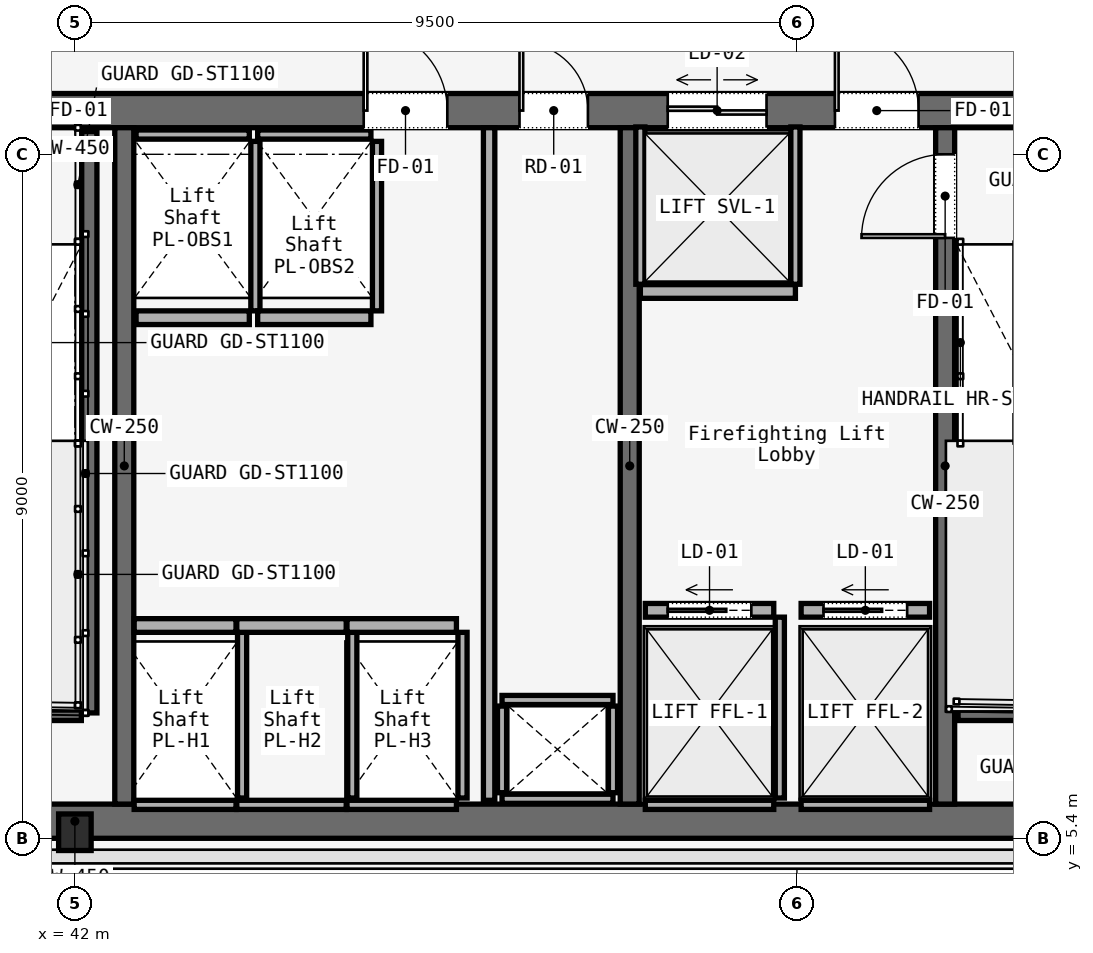
"""IFC4 building model, lengths in metres.
Left out: names, types, materials, properties, quantities, classifications, styles, units other than length and angle.
Written with IfcOpenShell. Run it as: python <this file> out.ifc"""

import sys

from ifc_helpers import new_model, si_unit, direction, frame, frame_2d, origin, origin_2d, place, context, subcontext, project, spatial, rectangle, i_section, extrude, element, fill, save


model = new_model("IFC4")
c1 = context("Model", 3, precision=1e-05, world=origin(), true_north=direction((0.0, 1.0)))
c2 = subcontext(c1, "Body", "Model", "MODEL_VIEW")
j1 = project(units=[si_unit("LENGTHUNIT", "METRE"), si_unit("PLANEANGLEUNIT", "RADIAN")], contexts=[c1])
p1 = place(None, origin())
s1 = spatial("IfcSite", under=j1, at=p1, CompositionType="ELEMENT")
p2 = place(p1, origin())
s2 = spatial("IfcBuilding", under=s1, at=p2, CompositionType="ELEMENT")
p3 = place(p2, frame((0.0, 0.0, 142.2)))
s3 = spatial("IfcBuildingStorey", under=s2, at=p3, CompositionType="ELEMENT", Elevation=142.2)
p4 = place(p3, frame((26.45, 14.975, 0.0), z_axis=(0.0, 0.0, 1.0), x_axis=(1.0, 0.0, 0.0)))
e1 = element("IfcWall", 1, at=p4, inside=s3, PredefinedType="SOLIDWALL", context=c2, shape_type="SweptSolid", body=[
    extrude(rectangle(XDim=31.1, YDim=0.45, at=frame_2d((15.55, 0.0))), origin(), (0.0, 0.0, 1.0), 3.58),
])
p5 = place(p4, frame((1.65, 0.0, 0.0)))
e2 = element("IfcOpeningElement", 2, at=p5, cuts=e1, PredefinedType="OPENING", context=c2, shape_type="SweptSolid", body=[
    extrude(rectangle(XDim=1.1, YDim=2.2, at=frame_2d((0.55, 1.1))), frame((0.0, 0.225, 0.0), z_axis=(0.0, -1.0, 0.0), x_axis=(1.0, 0.0, 0.0)), (0.0, 0.0, 1.0), 0.45),
])
p6 = place(p4, frame((13.65, 0.0, 0.0)))
e3 = element("IfcOpeningElement", 3, at=p6, cuts=e1, PredefinedType="OPENING", context=c2, shape_type="SweptSolid", body=[
    extrude(rectangle(XDim=1.1, YDim=2.2, at=frame_2d((0.55, 1.1))), frame((0.0, 0.225, 0.0), z_axis=(0.0, -1.0, 0.0), x_axis=(1.0, 0.0, 0.0)), (0.0, 0.0, 1.0), 0.45),
])
p7 = place(p4, frame((25.55, 0.0, 0.0)))
e4 = element("IfcOpeningElement", 4, at=p7, cuts=e1, PredefinedType="OPENING", context=c2, shape_type="SweptSolid", body=[
    extrude(rectangle(XDim=1.1, YDim=2.2, at=frame_2d((0.55, 1.1))), frame((0.0, 0.225, 0.0), z_axis=(0.0, -1.0, 0.0), x_axis=(1.0, 0.0, 0.0)), (0.0, 0.0, 1.0), 0.45),
])
p8 = place(p4, frame((10.7, 0.0, 0.0)))
e5 = element("IfcOpeningElement", 5, at=p8, cuts=e1, PredefinedType="OPENING", context=c2, shape_type="SweptSolid", body=[
    extrude(rectangle(XDim=1.4, YDim=2.2, at=frame_2d((0.7, 1.1))), frame((0.0, 0.225, 0.0), z_axis=(0.0, -1.0, 0.0), x_axis=(1.0, 0.0, 0.0)), (0.0, 0.0, 1.0), 0.45),
])
p9 = place(p4, frame((19.35, 0.0, 0.0)))
e6 = element("IfcOpeningElement", 6, at=p9, cuts=e1, PredefinedType="OPENING", context=c2, shape_type="SweptSolid", body=[
    extrude(rectangle(XDim=1.1, YDim=2.2, at=frame_2d((0.55, 1.1))), frame((0.0, 0.225, 0.0), z_axis=(0.0, -1.0, 0.0), x_axis=(1.0, 0.0, 0.0)), (0.0, 0.0, 1.0), 0.45),
])
p10 = place(p4, frame((21.4, 0.0, 0.0)))
e7 = element("IfcOpeningElement", 7, at=p10, cuts=e1, PredefinedType="OPENING", context=c2, shape_type="SweptSolid", body=[
    extrude(rectangle(XDim=0.9, YDim=2.1, at=frame_2d((0.45, 1.05))), frame((0.0, 0.225, 0.0), z_axis=(0.0, -1.0, 0.0), x_axis=(1.0, 0.0, 0.0)), (0.0, 0.0, 1.0), 0.45),
])
p11 = place(p4, frame((23.35, 0.0, 0.0)))
e8 = element("IfcOpeningElement", 8, at=p11, cuts=e1, PredefinedType="OPENING", context=c2, shape_type="SweptSolid", body=[
    extrude(rectangle(XDim=1.3, YDim=2.3, at=frame_2d((0.65, 1.15))), frame((0.0, 0.225, 0.0), z_axis=(0.0, -1.0, 0.0), x_axis=(1.0, 0.0, 0.0)), (0.0, 0.0, 1.0), 0.45),
])
p12 = place(p3, frame((26.45, 5.625, 0.0), z_axis=(0.0, 0.0, 1.0), x_axis=(1.0, 0.0, 0.0)))
e9 = element("IfcWall", 9, at=p12, inside=s3, PredefinedType="SOLIDWALL", context=c2, shape_type="SweptSolid", body=[
    extrude(rectangle(XDim=31.1, YDim=0.45, at=frame_2d((15.55, 0.0))), origin(), (0.0, 0.0, 1.0), 3.58),
])
for number, where, z_axis, x_axis in (
    (10, (42.65, 5.85, 0.0), (0.0, 0.0, 1.0), (0.0, 1.0, 0.0)),
    (11, (49.3, 5.85, 0.0), (0.0, 0.0, 1.0), (0.0, 1.0, 0.0)),
):
    element("IfcWall", number, at=place(p3, frame(where, z_axis=z_axis, x_axis=x_axis)), inside=s3, PredefinedType="SOLIDWALL", context=c2, shape_type="SweptSolid", body=[
        extrude(rectangle(XDim=8.9, YDim=0.25, at=frame_2d((4.45, 0.0))), origin(), (0.0, 0.0, 1.0), 3.58),
    ])
p13 = place(p3, frame((53.45, 5.85, 0.0), z_axis=(0.0, 0.0, 1.0), x_axis=(0.0, 1.0, 0.0)))
e12 = element("IfcWall", 12, at=p13, inside=s3, PredefinedType="SOLIDWALL", context=c2, shape_type="SweptSolid", body=[
    extrude(rectangle(XDim=8.9, YDim=0.25, at=frame_2d((4.45, 0.0))), origin(), (0.0, 0.0, 1.0), 3.58),
])
p14 = place(p13, frame((7.45, 0.0, 0.0)))
e13 = element("IfcOpeningElement", 13, at=p14, cuts=e12, PredefinedType="OPENING", context=c2, shape_type="SweptSolid", body=[
    extrude(rectangle(XDim=1.1, YDim=2.2, at=frame_2d((0.55, 1.1))), frame((0.0, 0.125, 0.0), z_axis=(0.0, -1.0, 0.0), x_axis=(1.0, 0.0, 0.0)), (0.0, 0.0, 1.0), 0.25),
])
p15 = place(p3, frame((42.0, 5.48, 0.0), z_axis=(0.0, 0.0, 1.0), x_axis=(1.0, 0.0, 0.0)))
e14 = element("IfcColumn", 14, at=p15, inside=s3, PredefinedType="COLUMN", context=c2, shape_type="SweptSolid", body=[
    extrude(i_section(OverallWidth=0.428, OverallDepth=0.481, WebThickness=0.051, FlangeThickness=0.065, FilletRadius=0.015, at=origin_2d()), origin(), (0.0, 0.0, 1.0), 3.58),
])
p16 = place(p3, frame((42.19, 14.7, 0.0), z_axis=(0.0, 0.0, 1.0), x_axis=(0.0, -1.0, 0.0)))
e15 = element("IfcWall", 15, at=p16, inside=s3, PredefinedType="SOLIDWALL", context=c2, shape_type="SweptSolid", body=[
    extrude(rectangle(XDim=7.65, YDim=0.2, at=frame_2d((3.825, 0.0))), origin(), (0.0, 0.0, 1.0), 3.8),
])
for number, where, z_axis, x_axis in (
    (16, (38.97, 7.05, 0.0), (0.0, 0.0, 1.0), (1.0, 0.0, 0.0)),
    (17, (53.62, 7.05, 0.0), (0.0, 0.0, 1.0), (1.0, 0.0, 0.0)),
):
    element("IfcWall", number, at=place(p3, frame(where, z_axis=z_axis, x_axis=x_axis)), inside=s3, PredefinedType="SOLIDWALL", context=c2, shape_type="SweptSolid", body=[
        extrude(rectangle(XDim=3.115, YDim=0.2, at=frame_2d((1.558, 0.0))), origin(), (0.0, 0.0, 1.0), 3.8),
    ])
for number, where, z_axis, x_axis in (
    (18, (47.62, 5.92, 0.0), (0.0, 0.0, 1.0), (1.0, 0.0, 0.0)),
    (19, (47.62, 7.22, 0.0), (0.0, 0.0, 1.0), (1.0, 0.0, 0.0)),
):
    element("IfcWall", number, at=place(p3, frame(where, z_axis=z_axis, x_axis=x_axis)), inside=s3, PredefinedType="SOLIDWALL", context=c2, shape_type="SweptSolid", body=[
        extrude(rectangle(XDim=1.46, YDim=0.12, at=frame_2d((0.73, 0.0))), origin(), (0.0, 0.0, 1.0), 3.01),
    ])
for number, where, z_axis, x_axis in (
    (20, (47.62, 6.0, 0.0), (0.0, 0.0, 1.0), (0.0, 1.0, 0.0)),
    (21, (49.08, 6.0, 0.0), (0.0, 0.0, 1.0), (0.0, 1.0, 0.0)),
):
    element("IfcWall", number, at=place(p3, frame(where, z_axis=z_axis, x_axis=x_axis)), inside=s3, PredefinedType="SOLIDWALL", context=c2, shape_type="SweptSolid", body=[
        extrude(rectangle(XDim=1.14, YDim=0.12, at=frame_2d((0.57, 0.0))), origin(), (0.0, 0.0, 1.0), 3.01),
    ])
p17 = place(p3, frame((47.45, 5.9, 0.0), z_axis=(0.0, 0.0, 1.0), x_axis=(0.0, 1.0, 0.0)))
e22 = element("IfcWall", 22, at=p17, inside=s3, PredefinedType="PARTITIONING", context=c2, shape_type="SweptSolid", body=[
    extrude(rectangle(XDim=8.85, YDim=0.15, at=frame_2d((4.425, 0.0))), origin(), (0.0, 0.0, 1.0), 3.01),
])
p18 = place(p3, frame((42.78, 8.2, 0.0), z_axis=(0.0, 0.0, 1.0), x_axis=(1.0, 0.0, 0.0)))
e23 = element("IfcWall", 23, at=p18, inside=s3, PredefinedType="SOLIDWALL", context=c2, shape_type="SweptSolid", body=[
    extrude(rectangle(XDim=1.34, YDim=0.18, at=frame_2d((0.67, 0.0))), origin(), (0.0, 0.0, 1.0), 3.01),
])
p19 = place(p3, frame((42.78, 5.84, 0.0), z_axis=(0.0, 0.0, 1.0), x_axis=(1.0, 0.0, 0.0)))
e24 = element("IfcWall", 24, at=p19, inside=s3, PredefinedType="SOLIDWALL", context=c2, shape_type="SweptSolid", body=[
    extrude(rectangle(XDim=1.34, YDim=0.12, at=frame_2d((0.67, 0.0))), origin(), (0.0, 0.0, 1.0), 3.01),
])
p20 = place(p3, frame((44.2, 5.93, 0.0), z_axis=(0.0, 0.0, 1.0), x_axis=(0.0, 1.0, 0.0)))
e25 = element("IfcWall", 25, at=p20, inside=s3, PredefinedType="SOLIDWALL", context=c2, shape_type="SweptSolid", body=[
    extrude(rectangle(XDim=2.18, YDim=0.12, at=frame_2d((1.09, 0.0))), origin(), (0.0, 0.0, 1.0), 3.01),
])
p21 = place(p3, frame((44.13, 8.2, 0.0), z_axis=(0.0, 0.0, 1.0), x_axis=(1.0, 0.0, 0.0)))
e26 = element("IfcWall", 26, at=p21, inside=s3, PredefinedType="SOLIDWALL", context=c2, shape_type="SweptSolid", body=[
    extrude(rectangle(XDim=1.44, YDim=0.18, at=frame_2d((0.72, 0.0))), origin(), (0.0, 0.0, 1.0), 3.01),
])
p22 = place(p3, frame((44.13, 5.84, 0.0), z_axis=(0.0, 0.0, 1.0), x_axis=(1.0, 0.0, 0.0)))
e27 = element("IfcWall", 27, at=p22, inside=s3, PredefinedType="SOLIDWALL", context=c2, shape_type="SweptSolid", body=[
    extrude(rectangle(XDim=1.44, YDim=0.12, at=frame_2d((0.72, 0.0))), origin(), (0.0, 0.0, 1.0), 3.01),
])
p23 = place(p3, frame((45.65, 5.93, 0.0), z_axis=(0.0, 0.0, 1.0), x_axis=(0.0, 1.0, 0.0)))
e28 = element("IfcWall", 28, at=p23, inside=s3, PredefinedType="SOLIDWALL", context=c2, shape_type="SweptSolid", body=[
    extrude(rectangle(XDim=2.18, YDim=0.12, at=frame_2d((1.09, 0.0))), origin(), (0.0, 0.0, 1.0), 3.01),
])
p24 = place(p3, frame((45.58, 8.2, 0.0), z_axis=(0.0, 0.0, 1.0), x_axis=(1.0, 0.0, 0.0)))
e29 = element("IfcWall", 29, at=p24, inside=s3, PredefinedType="SOLIDWALL", context=c2, shape_type="SweptSolid", body=[
    extrude(rectangle(XDim=1.44, YDim=0.18, at=frame_2d((0.72, 0.0))), origin(), (0.0, 0.0, 1.0), 3.01),
])
p25 = place(p3, frame((45.58, 5.84, 0.0), z_axis=(0.0, 0.0, 1.0), x_axis=(1.0, 0.0, 0.0)))
e30 = element("IfcWall", 30, at=p25, inside=s3, PredefinedType="SOLIDWALL", context=c2, shape_type="SweptSolid", body=[
    extrude(rectangle(XDim=1.44, YDim=0.12, at=frame_2d((0.72, 0.0))), origin(), (0.0, 0.0, 1.0), 3.01),
])
p26 = place(p3, frame((47.1, 5.93, 0.0), z_axis=(0.0, 0.0, 1.0), x_axis=(0.0, 1.0, 0.0)))
e31 = element("IfcWall", 31, at=p26, inside=s3, PredefinedType="SOLIDWALL", context=c2, shape_type="SweptSolid", body=[
    extrude(rectangle(XDim=2.18, YDim=0.12, at=frame_2d((1.09, 0.0))), origin(), (0.0, 0.0, 1.0), 3.01),
])
p27 = place(p3, frame((42.805, 12.25, 0.0), z_axis=(0.0, 0.0, 1.0), x_axis=(1.0, 0.0, 0.0)))
e32 = element("IfcWall", 32, at=p27, inside=s3, PredefinedType="SOLIDWALL", context=c2, shape_type="SweptSolid", body=[
    extrude(rectangle(XDim=1.49, YDim=0.18, at=frame_2d((0.745, 0.0))), origin(), (0.0, 0.0, 1.0), 3.01),
])
p28 = place(p3, frame((42.805, 14.66, 0.0), z_axis=(0.0, 0.0, 1.0), x_axis=(1.0, 0.0, 0.0)))
e33 = element("IfcWall", 33, at=p28, inside=s3, PredefinedType="SOLIDWALL", context=c2, shape_type="SweptSolid", body=[
    extrude(rectangle(XDim=1.49, YDim=0.12, at=frame_2d((0.745, 0.0))), origin(), (0.0, 0.0, 1.0), 3.01),
])
p29 = place(p3, frame((44.375, 12.34, 0.0), z_axis=(0.0, 0.0, 1.0), x_axis=(0.0, 1.0, 0.0)))
e34 = element("IfcWall", 34, at=p29, inside=s3, PredefinedType="SOLIDWALL", context=c2, shape_type="SweptSolid", body=[
    extrude(rectangle(XDim=2.23, YDim=0.12, at=frame_2d((1.115, 0.0))), origin(), (0.0, 0.0, 1.0), 3.01),
])
p30 = place(p3, frame((44.405, 12.25, 0.0), z_axis=(0.0, 0.0, 1.0), x_axis=(1.0, 0.0, 0.0)))
e35 = element("IfcWall", 35, at=p30, inside=s3, PredefinedType="SOLIDWALL", context=c2, shape_type="SweptSolid", body=[
    extrude(rectangle(XDim=1.49, YDim=0.18, at=frame_2d((0.745, 0.0))), origin(), (0.0, 0.0, 1.0), 3.01),
])
p31 = place(p3, frame((44.405, 14.66, 0.0), z_axis=(0.0, 0.0, 1.0), x_axis=(1.0, 0.0, 0.0)))
e36 = element("IfcWall", 36, at=p31, inside=s3, PredefinedType="SOLIDWALL", context=c2, shape_type="SweptSolid", body=[
    extrude(rectangle(XDim=1.49, YDim=0.12, at=frame_2d((0.745, 0.0))), origin(), (0.0, 0.0, 1.0), 3.01),
])
p32 = place(p3, frame((45.975, 12.34, 0.0), z_axis=(0.0, 0.0, 1.0), x_axis=(0.0, 1.0, 0.0)))
e37 = element("IfcWall", 37, at=p32, inside=s3, PredefinedType="SOLIDWALL", context=c2, shape_type="SweptSolid", body=[
    extrude(rectangle(XDim=2.23, YDim=0.12, at=frame_2d((1.115, 0.0))), origin(), (0.0, 0.0, 1.0), 3.01),
])
p33 = place(p3, frame((49.505, 8.4, 0.0), z_axis=(0.0, 0.0, 1.0), x_axis=(1.0, 0.0, 0.0)))
e38 = element("IfcWall", 38, at=p33, inside=s3, PredefinedType="SOLIDWALL", context=c2, shape_type="SweptSolid", body=[
    extrude(rectangle(XDim=1.69, YDim=0.18, at=frame_2d((0.845, 0.0))), origin(), (0.0, 0.0, 1.0), 3.01),
])
p34 = place(p33, frame((0.295, 0.0, 0.0)))
e39 = element("IfcOpeningElement", 39, at=p34, cuts=e38, PredefinedType="OPENING", context=c2, shape_type="SweptSolid", body=[
    extrude(rectangle(XDim=1.1, YDim=2.2, at=frame_2d((0.55, 1.1))), frame((0.0, 0.09, 0.0), z_axis=(0.0, -1.0, 0.0), x_axis=(1.0, 0.0, 0.0)), (0.0, 0.0, 1.0), 0.18),
])
p35 = place(p3, frame((49.505, 5.84, 0.0), z_axis=(0.0, 0.0, 1.0), x_axis=(1.0, 0.0, 0.0)))
e40 = element("IfcWall", 40, at=p35, inside=s3, PredefinedType="SOLIDWALL", context=c2, shape_type="SweptSolid", body=[
    extrude(rectangle(XDim=1.69, YDim=0.12, at=frame_2d((0.845, 0.0))), origin(), (0.0, 0.0, 1.0), 3.01),
])
p36 = place(p3, frame((51.275, 5.93, 0.0), z_axis=(0.0, 0.0, 1.0), x_axis=(0.0, 1.0, 0.0)))
e41 = element("IfcWall", 41, at=p36, inside=s3, PredefinedType="SOLIDWALL", context=c2, shape_type="SweptSolid", body=[
    extrude(rectangle(XDim=2.38, YDim=0.12, at=frame_2d((1.19, 0.0))), origin(), (0.0, 0.0, 1.0), 3.01),
])
p37 = place(p3, frame((51.555, 8.4, 0.0), z_axis=(0.0, 0.0, 1.0), x_axis=(1.0, 0.0, 0.0)))
e42 = element("IfcWall", 42, at=p37, inside=s3, PredefinedType="SOLIDWALL", context=c2, shape_type="SweptSolid", body=[
    extrude(rectangle(XDim=1.69, YDim=0.18, at=frame_2d((0.845, 0.0))), origin(), (0.0, 0.0, 1.0), 3.01),
])
p38 = place(p37, frame((0.295, 0.0, 0.0)))
e43 = element("IfcOpeningElement", 43, at=p38, cuts=e42, PredefinedType="OPENING", context=c2, shape_type="SweptSolid", body=[
    extrude(rectangle(XDim=1.1, YDim=2.2, at=frame_2d((0.55, 1.1))), frame((0.0, 0.09, 0.0), z_axis=(0.0, -1.0, 0.0), x_axis=(1.0, 0.0, 0.0)), (0.0, 0.0, 1.0), 0.18),
])
p39 = place(p3, frame((51.555, 5.84, 0.0), z_axis=(0.0, 0.0, 1.0), x_axis=(1.0, 0.0, 0.0)))
e44 = element("IfcWall", 44, at=p39, inside=s3, PredefinedType="SOLIDWALL", context=c2, shape_type="SweptSolid", body=[
    extrude(rectangle(XDim=1.69, YDim=0.12, at=frame_2d((0.845, 0.0))), origin(), (0.0, 0.0, 1.0), 3.01),
])
p40 = place(p3, frame((49.44, 12.595, 0.0), z_axis=(0.0, 0.0, 1.0), x_axis=(1.0, 0.0, 0.0)))
e45 = element("IfcWall", 45, at=p40, inside=s3, PredefinedType="SOLIDWALL", context=c2, shape_type="SweptSolid", body=[
    extrude(rectangle(XDim=2.04, YDim=0.18, at=frame_2d((1.02, 0.0))), origin(), (0.0, 0.0, 1.0), 3.01),
])
for number, where, z_axis, x_axis in (
    (46, (49.44, 12.69, 0.0), (0.0, 0.0, 1.0), (0.0, 1.0, 0.0)),
    (47, (51.48, 12.69, 0.0), (0.0, 0.0, 1.0), (0.0, 1.0, 0.0)),
):
    element("IfcWall", number, at=place(p3, frame(where, z_axis=z_axis, x_axis=x_axis)), inside=s3, PredefinedType="SOLIDWALL", context=c2, shape_type="SweptSolid", body=[
        extrude(rectangle(XDim=2.07, YDim=0.12, at=frame_2d((1.035, 0.0))), origin(), (0.0, 0.0, 1.0), 3.01),
    ])
p41 = place(p7, origin())
e48 = element("IfcDoor", 48, at=p41, inside=s3, OperationType="SINGLE_SWING_RIGHT", PredefinedType="DOOR", context=c2, shape_type="SweptSolid", body=[
    extrude(rectangle(XDim=1.1, YDim=2.2, at=frame_2d((0.55, 1.1))), frame((0.0, 0.025, 0.0), z_axis=(0.0, -1.0, 0.0), x_axis=(1.0, 0.0, 0.0)), (0.0, 0.0, 1.0), 0.05),
])
fill(e4, e48)
p42 = place(p9, origin())
e49 = element("IfcDoor", 49, at=p42, inside=s3, OperationType="SINGLE_SWING_LEFT", PredefinedType="DOOR", context=c2, shape_type="SweptSolid", body=[
    extrude(rectangle(XDim=1.1, YDim=2.2, at=frame_2d((0.55, 1.1))), frame((0.0, 0.025, 0.0), z_axis=(0.0, -1.0, 0.0), x_axis=(1.0, 0.0, 0.0)), (0.0, 0.0, 1.0), 0.05),
])
fill(e6, e49)
p43 = place(p10, origin())
e50 = element("IfcDoor", 50, at=p43, inside=s3, OperationType="SINGLE_SWING_LEFT", PredefinedType="DOOR", context=c2, shape_type="SweptSolid", body=[
    extrude(rectangle(XDim=0.9, YDim=2.1, at=frame_2d((0.45, 1.05))), frame((0.0, 0.025, 0.0), z_axis=(0.0, -1.0, 0.0), x_axis=(1.0, 0.0, 0.0)), (0.0, 0.0, 1.0), 0.05),
])
fill(e7, e50)
p44 = place(p14, origin())
e51 = element("IfcDoor", 51, at=p44, inside=s3, OperationType="SINGLE_SWING_LEFT", PredefinedType="DOOR", context=c2, shape_type="SweptSolid", body=[
    extrude(rectangle(XDim=1.1, YDim=2.2, at=frame_2d((0.55, 1.1))), frame((0.0, 0.025, 0.0), z_axis=(0.0, -1.0, 0.0), x_axis=(1.0, 0.0, 0.0)), (0.0, 0.0, 1.0), 0.05),
])
fill(e13, e51)
p45 = place(p34, origin())
e52 = element("IfcDoor", 52, at=p45, inside=s3, OperationType="SLIDING_TO_LEFT", PredefinedType="DOOR", context=c2, shape_type="SweptSolid", body=[
    extrude(rectangle(XDim=1.1, YDim=2.2, at=frame_2d((0.55, 1.1))), frame((0.0, 0.025, 0.0), z_axis=(0.0, -1.0, 0.0), x_axis=(1.0, 0.0, 0.0)), (0.0, 0.0, 1.0), 0.05),
])
fill(e39, e52)
p46 = place(p38, origin())
e53 = element("IfcDoor", 53, at=p46, inside=s3, OperationType="SLIDING_TO_LEFT", PredefinedType="DOOR", context=c2, shape_type="SweptSolid", body=[
    extrude(rectangle(XDim=1.1, YDim=2.2, at=frame_2d((0.55, 1.1))), frame((0.0, 0.025, 0.0), z_axis=(0.0, -1.0, 0.0), x_axis=(1.0, 0.0, 0.0)), (0.0, 0.0, 1.0), 0.05),
])
fill(e43, e53)
p47 = place(p11, origin())
e54 = element("IfcDoor", 54, at=p47, inside=s3, OperationType="DOUBLE_DOOR_SLIDING", PredefinedType="DOOR", context=c2, shape_type="SweptSolid", body=[
    extrude(rectangle(XDim=1.3, YDim=2.3, at=frame_2d((0.65, 1.15))), frame((0.0, 0.025, 0.0), z_axis=(0.0, -1.0, 0.0), x_axis=(1.0, 0.0, 0.0)), (0.0, 0.0, 1.0), 0.05),
])
fill(e8, e54)
save(model, sys.argv[1])
